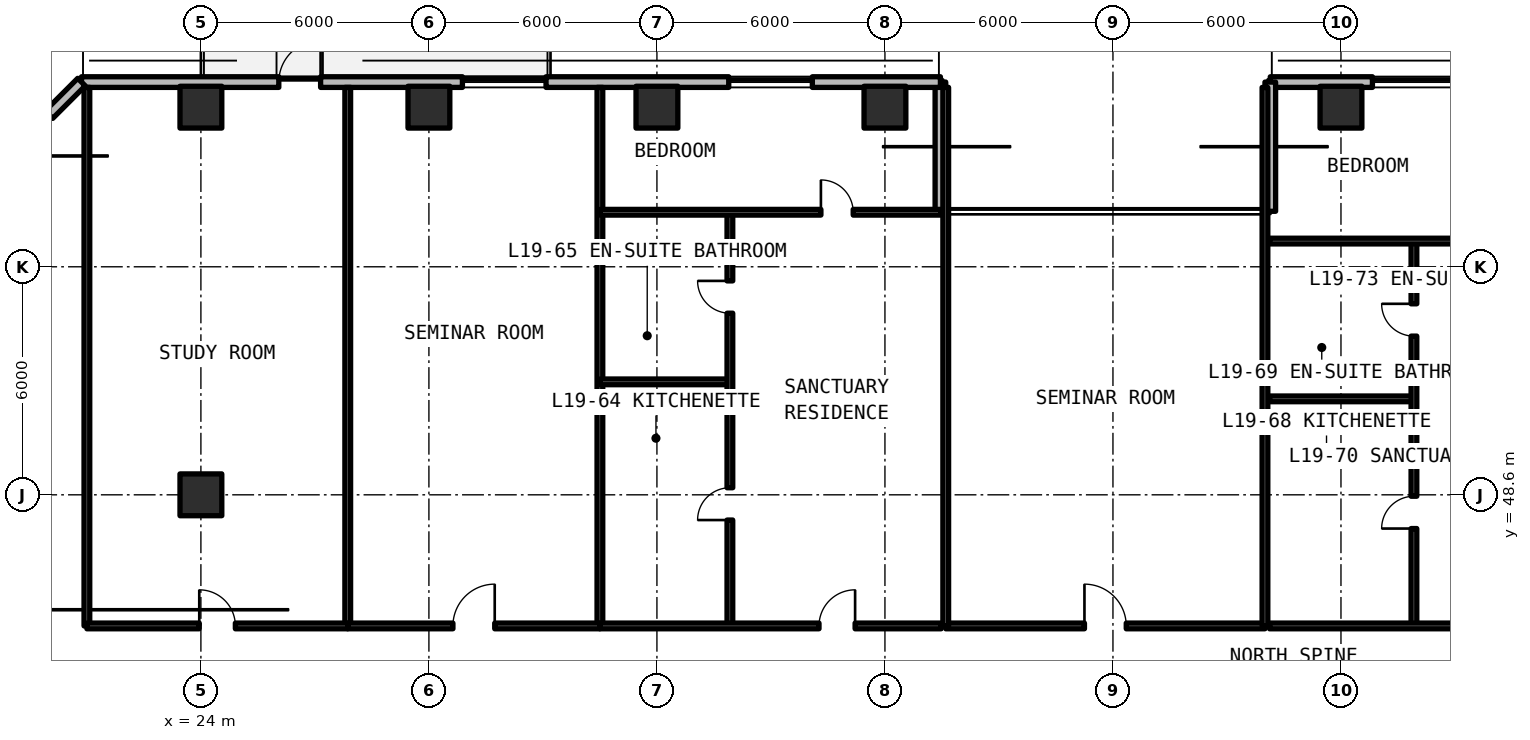
"""IFC4 building model, lengths in metres.
Left out: names, types, materials, properties, quantities, classifications, styles, units other than length and angle.
Written with IfcOpenShell. Run it as: python <this file> out.ifc"""

import sys

from ifc_helpers import new_model, si_unit, direction, frame, frame_2d, origin, origin_2d, place, context, subcontext, project, spatial, rectangle, extrude, element, fill, save


model = new_model("IFC4")
c1 = context("Model", 3, precision=1e-05, world=origin(), true_north=direction((0.0, 1.0)))
c2 = subcontext(c1, "Body", "Model", "MODEL_VIEW")
j1 = project(units=[si_unit("LENGTHUNIT", "METRE"), si_unit("PLANEANGLEUNIT", "RADIAN")], contexts=[c1])
p1 = place(None, origin())
s1 = spatial("IfcSite", under=j1, at=p1, CompositionType="ELEMENT")
p2 = place(p1, origin())
s2 = spatial("IfcBuilding", under=s1, at=p2, CompositionType="ELEMENT")
p3 = place(p2, frame((0.0, 0.0, 69.63)))
s3 = spatial("IfcBuildingStorey", under=s2, at=p3, CompositionType="ELEMENT", Elevation=69.63)
for number, where, z_axis, x_axis in (
    (1, (24.0, 48.6, 0.0), (0.0, 0.0, 1.0), (1.0, 0.0, 0.0)),
    (2, (24.0, 58.8, 0.0), (0.0, 0.0, 1.0), (1.0, 0.0, 0.0)),
    (3, (30.0, 58.8, 0.0), (0.0, 0.0, 1.0), (1.0, 0.0, 0.0)),
    (4, (36.0, 58.8, 0.0), (0.0, 0.0, 1.0), (1.0, 0.0, 0.0)),
    (5, (42.0, 58.8, 0.0), (0.0, 0.0, 1.0), (1.0, 0.0, 0.0)),
    (6, (54.0, 58.8, 0.0), (0.0, 0.0, 1.0), (1.0, 0.0, 0.0)),
):
    element("IfcColumn", number, at=place(p3, frame(where, z_axis=z_axis, x_axis=x_axis)), inside=s3, PredefinedType="COLUMN", context=c2, shape_type="SweptSolid", body=[
        extrude(rectangle(XDim=1.1, YDim=1.1, at=origin_2d()), origin(), (0.0, 0.0, 1.0), 3.63),
    ])
p4 = place(p3, frame((96.542, 59.46, 0.0), z_axis=(0.0, 0.0, 1.0), x_axis=(-1.0, 0.0, 0.0)))
e7 = element("IfcWall", 7, at=p4, inside=s3, PredefinedType="SOLIDWALL", context=c2, shape_type="SweptSolid", body=[
    extrude(rectangle(XDim=44.402, YDim=0.28, at=frame_2d((22.201, 0.0))), origin(), (0.0, 0.0, 1.0), 3.35),
])
p5 = place(p4, frame((32.592, 0.0, 0.0)))
e8 = element("IfcOpeningElement", 8, at=p5, cuts=e7, PredefinedType="OPENING", context=c2, shape_type="SweptSolid", body=[
    extrude(rectangle(XDim=1.1, YDim=2.15, at=frame_2d((0.55, 1.075))), frame((0.0, 0.15, 0.0), z_axis=(0.0, -1.0, 0.0), x_axis=(1.0, 0.0, 0.0)), (0.0, 0.0, 1.0), 0.3),
])
p6 = place(p4, frame((20.242, 0.0, 0.0)))
e9 = element("IfcOpeningElement", 9, at=p6, cuts=e7, PredefinedType="OPENING", context=c2, shape_type="SweptSolid", body=[
    extrude(rectangle(XDim=1.1, YDim=2.15, at=frame_2d((0.55, 1.075))), frame((0.0, 0.15, 0.0), z_axis=(0.0, -1.0, 0.0), x_axis=(1.0, 0.0, 0.0)), (0.0, 0.0, 1.0), 0.3),
])
p7 = place(p4, frame((9.392, 0.0, 0.0)))
e10 = element("IfcOpeningElement", 10, at=p7, cuts=e7, PredefinedType="OPENING", context=c2, shape_type="SweptSolid", body=[
    extrude(rectangle(XDim=1.1, YDim=2.15, at=frame_2d((0.55, 1.075))), frame((0.0, 0.15, 0.0), z_axis=(0.0, -1.0, 0.0), x_axis=(1.0, 0.0, 0.0)), (0.0, 0.0, 1.0), 0.3),
])
p8 = place(p4, frame((39.514, 0.0, 0.78)))
e11 = element("IfcOpeningElement", 11, at=p8, cuts=e7, PredefinedType="OPENING", context=c2, shape_type="SweptSolid", body=[
    extrude(rectangle(XDim=2.2, YDim=1.66, at=frame_2d((1.1, 0.83))), frame((0.0, 0.15, 0.0), z_axis=(0.0, -1.0, 0.0), x_axis=(1.0, 0.0, 0.0)), (0.0, 0.0, 1.0), 0.3),
])
p9 = place(p4, frame((25.379, 0.0, 0.78)))
e12 = element("IfcOpeningElement", 12, at=p9, cuts=e7, PredefinedType="OPENING", context=c2, shape_type="SweptSolid", body=[
    extrude(rectangle(XDim=2.2, YDim=1.66, at=frame_2d((1.1, 0.83))), frame((0.0, 0.15, 0.0), z_axis=(0.0, -1.0, 0.0), x_axis=(1.0, 0.0, 0.0)), (0.0, 0.0, 1.0), 0.3),
])
p10 = place(p4, frame((2.564, 0.0, 0.78)))
e13 = element("IfcOpeningElement", 13, at=p10, cuts=e7, PredefinedType="OPENING", context=c2, shape_type="SweptSolid", body=[
    extrude(rectangle(XDim=2.2, YDim=1.66, at=frame_2d((1.1, 0.83))), frame((0.0, 0.15, 0.0), z_axis=(0.0, -1.0, 0.0), x_axis=(1.0, 0.0, 0.0)), (0.0, 0.0, 1.0), 0.3),
])
for number, where, z_axis, x_axis in (
    (14, (52.14, 59.46, 0.0), (0.0, 0.0, 1.0), (0.0, -1.0, 0.0)),
    (15, (43.46, 56.06, 0.0), (0.0, 0.0, 1.0), (0.0, 1.0, 0.0)),
):
    element("IfcWall", number, at=place(p3, frame(where, z_axis=z_axis, x_axis=x_axis)), inside=s3, PredefinedType="SOLIDWALL", context=c2, shape_type="SweptSolid", body=[
        extrude(rectangle(XDim=3.4, YDim=0.28, at=frame_2d((1.7, 0.0))), origin(), (0.0, 0.0, 1.0), 3.35),
    ])
p11 = place(p3, frame((43.46, 59.46, 0.0), z_axis=(0.0, 0.0, 1.0), x_axis=(-1.0, 0.0, 0.0)))
e16 = element("IfcWall", 16, at=p11, inside=s3, PredefinedType="SOLIDWALL", context=c2, shape_type="SweptSolid", body=[
    extrude(rectangle(XDim=22.602, YDim=0.28, at=frame_2d((11.301, 0.0))), origin(), (0.0, 0.0, 1.0), 3.35),
])
p12 = place(p11, frame((16.31, 0.0, 0.0)))
e17 = element("IfcOpeningElement", 17, at=p12, cuts=e16, PredefinedType="OPENING", context=c2, shape_type="SweptSolid", body=[
    extrude(rectangle(XDim=1.1, YDim=2.15, at=frame_2d((0.55, 1.075))), frame((0.0, 0.15, 0.0), z_axis=(0.0, -1.0, 0.0), x_axis=(1.0, 0.0, 0.0)), (0.0, 0.0, 1.0), 0.3),
])
p13 = place(p11, frame((10.378, 0.0, 0.78)))
e18 = element("IfcOpeningElement", 18, at=p13, cuts=e16, PredefinedType="OPENING", context=c2, shape_type="SweptSolid", body=[
    extrude(rectangle(XDim=2.2, YDim=1.66, at=frame_2d((1.1, 0.83))), frame((0.0, 0.15, 0.0), z_axis=(0.0, -1.0, 0.0), x_axis=(1.0, 0.0, 0.0)), (0.0, 0.0, 1.0), 0.3),
])
p14 = place(p11, frame((3.37, 0.0, 0.78)))
e19 = element("IfcOpeningElement", 19, at=p14, cuts=e16, PredefinedType="OPENING", context=c2, shape_type="SweptSolid", body=[
    extrude(rectangle(XDim=2.2, YDim=1.66, at=frame_2d((1.1, 0.83))), frame((0.0, 0.15, 0.0), z_axis=(0.0, -1.0, 0.0), x_axis=(1.0, 0.0, 0.0)), (0.0, 0.0, 1.0), 0.3),
])
p15 = place(p3, frame((20.858, 59.46, 0.0), z_axis=(0.0, 0.0, 1.0), x_axis=(-0.707106781187, -0.707106781187, 0.0)))
e20 = element("IfcWall", 20, at=p15, inside=s3, PredefinedType="SOLIDWALL", context=c2, shape_type="SweptSolid", body=[
    extrude(rectangle(XDim=5.824, YDim=0.28, at=frame_2d((2.912, 0.0))), origin(), (0.0, 0.0, 1.0), 3.35),
])
p16 = place(p15, frame((1.212, 0.0, 0.78)))
e21 = element("IfcOpeningElement", 21, at=p16, cuts=e20, PredefinedType="OPENING", context=c2, shape_type="SweptSolid", body=[
    extrude(rectangle(XDim=3.4, YDim=1.66, at=frame_2d((1.7, 0.83))), frame((0.0, 0.15, 0.0), z_axis=(0.0, -1.0, 0.0), x_axis=(1.0, 0.0, 0.0)), (0.0, 0.0, 1.0), 0.3),
])
p17 = place(p3, frame((43.6, 45.15, 0.0), z_axis=(0.0, 0.0, 1.0), x_axis=(1.0, 0.0, 0.0)))
e22 = element("IfcWall", 22, at=p17, inside=s3, PredefinedType="SOLIDWALL", context=c2, shape_type="SweptSolid", body=[
    extrude(rectangle(XDim=8.4, YDim=0.15, at=frame_2d((4.2, 0.0))), origin(), (0.0, 0.0, 1.0), 2.57),
])
p18 = place(p17, frame((3.65, 0.0, 0.0)))
e23 = element("IfcOpeningElement", 23, at=p18, cuts=e22, PredefinedType="OPENING", context=c2, shape_type="SweptSolid", body=[
    extrude(rectangle(XDim=1.1, YDim=2.15, at=frame_2d((0.55, 1.075))), frame((0.0, 0.085, 0.0), z_axis=(0.0, -1.0, 0.0), x_axis=(1.0, 0.0, 0.0)), (0.0, 0.0, 1.0), 0.17),
])
for number, where, z_axis, x_axis in (
    (24, (43.6, 45.15, 0.0), (0.0, 0.0, 1.0), (0.0, 1.0, 0.0)),
    (25, (52.0, 45.15, 0.0), (0.0, 0.0, 1.0), (0.0, 1.0, 0.0)),
    (26, (21.0, 45.15, 0.0), (0.0, 0.0, 1.0), (0.0, 1.0, 0.0)),
    (27, (27.864, 45.15, 0.0), (0.0, 0.0, 1.0), (0.0, 1.0, 0.0)),
):
    element("IfcWall", number, at=place(p3, frame(where, z_axis=z_axis, x_axis=x_axis)), inside=s3, PredefinedType="SOLIDWALL", context=c2, shape_type="SweptSolid", body=[
        extrude(rectangle(XDim=14.17, YDim=0.15, at=frame_2d((7.085, 0.0))), origin(), (0.0, 0.0, 1.0), 2.57),
    ])
p19 = place(p3, frame((21.0, 45.15, 0.0), z_axis=(0.0, 0.0, 1.0), x_axis=(1.0, 0.0, 0.0)))
e28 = element("IfcWall", 28, at=p19, inside=s3, PredefinedType="SOLIDWALL", context=c2, shape_type="SweptSolid", body=[
    extrude(rectangle(XDim=6.864, YDim=0.15, at=frame_2d((3.432, 0.0))), origin(), (0.0, 0.0, 1.0), 2.57),
])
p20 = place(p19, frame((2.957, 0.0, 0.0)))
e29 = element("IfcOpeningElement", 29, at=p20, cuts=e28, PredefinedType="OPENING", context=c2, shape_type="SweptSolid", body=[
    extrude(rectangle(XDim=0.95, YDim=2.15, at=frame_2d((0.475, 1.075))), frame((0.0, 0.085, 0.0), z_axis=(0.0, -1.0, 0.0), x_axis=(1.0, 0.0, 0.0)), (0.0, 0.0, 1.0), 0.17),
])
p21 = place(p3, frame((34.5, 45.15, 0.0), z_axis=(0.0, 0.0, 1.0), x_axis=(0.0, 1.0, 0.0)))
e30 = element("IfcWall", 30, at=p21, inside=s3, PredefinedType="SOLIDWALL", context=c2, shape_type="SweptSolid", body=[
    extrude(rectangle(XDim=14.17, YDim=0.15, at=frame_2d((7.085, 0.0))), origin(), (0.0, 0.0, 1.0), 2.57),
])
p22 = place(p3, frame((27.864, 45.15, 0.0), z_axis=(0.0, 0.0, 1.0), x_axis=(1.0, 0.0, 0.0)))
e31 = element("IfcWall", 31, at=p22, inside=s3, PredefinedType="SOLIDWALL", context=c2, shape_type="SweptSolid", body=[
    extrude(rectangle(XDim=6.635, YDim=0.15, at=frame_2d((3.318, 0.0))), origin(), (0.0, 0.0, 1.0), 2.57),
])
p23 = place(p22, frame((2.768, 0.0, 0.0)))
e32 = element("IfcOpeningElement", 32, at=p23, cuts=e31, PredefinedType="OPENING", context=c2, shape_type="SweptSolid", body=[
    extrude(rectangle(XDim=1.1, YDim=2.15, at=frame_2d((0.55, 1.075))), frame((0.0, 0.085, 0.0), z_axis=(0.0, -1.0, 0.0), x_axis=(1.0, 0.0, 0.0)), (0.0, 0.0, 1.0), 0.17),
])
p24 = place(p3, frame((34.5, 51.572, 0.0), z_axis=(0.0, 0.0, 1.0), x_axis=(1.0, 0.0, 0.0)))
e33 = element("IfcWall", 33, at=p24, inside=s3, PredefinedType="PARTITIONING", context=c2, shape_type="SweptSolid", body=[
    extrude(rectangle(XDim=3.42, YDim=0.15, at=frame_2d((1.71, 0.0))), origin(), (0.0, 0.0, 1.0), 2.57),
])
p25 = place(p3, frame((37.92, 45.15, 0.0), z_axis=(0.0, 0.0, 1.0), x_axis=(0.0, 1.0, 0.0)))
e34 = element("IfcWall", 34, at=p25, inside=s3, PredefinedType="PARTITIONING", context=c2, shape_type="SweptSolid", body=[
    extrude(rectangle(XDim=10.885, YDim=0.15, at=frame_2d((5.443, 0.0))), origin(), (0.0, 0.0, 1.0), 2.57),
])
p26 = place(p25, frame((2.786, 0.0, 0.0)))
e35 = element("IfcOpeningElement", 35, at=p26, cuts=e34, PredefinedType="OPENING", context=c2, shape_type="SweptSolid", body=[
    extrude(rectangle(XDim=0.85, YDim=2.1, at=frame_2d((0.425, 1.05))), frame((0.0, 0.085, 0.0), z_axis=(0.0, -1.0, 0.0), x_axis=(1.0, 0.0, 0.0)), (0.0, 0.0, 1.0), 0.17),
])
p27 = place(p25, frame((8.229, 0.0, 0.0)))
e36 = element("IfcOpeningElement", 36, at=p27, cuts=e34, PredefinedType="OPENING", context=c2, shape_type="SweptSolid", body=[
    extrude(rectangle(XDim=0.85, YDim=2.1, at=frame_2d((0.425, 1.05))), frame((0.0, 0.085, 0.0), z_axis=(0.0, -1.0, 0.0), x_axis=(1.0, 0.0, 0.0)), (0.0, 0.0, 1.0), 0.17),
])
p28 = place(p3, frame((34.5, 56.035, 0.0), z_axis=(0.0, 0.0, 1.0), x_axis=(1.0, 0.0, 0.0)))
e37 = element("IfcWall", 37, at=p28, inside=s3, PredefinedType="PARTITIONING", context=c2, shape_type="SweptSolid", body=[
    extrude(rectangle(XDim=8.98, YDim=0.15, at=frame_2d((4.49, 0.0))), origin(), (0.0, 0.0, 1.0), 2.57),
])
p29 = place(p28, frame((5.816, 0.0, 0.0)))
e38 = element("IfcOpeningElement", 38, at=p29, cuts=e37, PredefinedType="OPENING", context=c2, shape_type="SweptSolid", body=[
    extrude(rectangle(XDim=0.85, YDim=2.1, at=frame_2d((0.425, 1.05))), frame((0.0, 0.085, 0.0), z_axis=(0.0, -1.0, 0.0), x_axis=(1.0, 0.0, 0.0)), (0.0, 0.0, 1.0), 0.17),
])
p30 = place(p3, frame((34.5, 45.15, 0.0), z_axis=(0.0, 0.0, 1.0), x_axis=(1.0, 0.0, 0.0)))
e39 = element("IfcWall", 39, at=p30, inside=s3, PredefinedType="SOLIDWALL", context=c2, shape_type="SweptSolid", body=[
    extrude(rectangle(XDim=8.98, YDim=0.15, at=frame_2d((4.49, 0.0))), origin(), (0.0, 0.0, 1.0), 2.57),
])
p31 = place(p30, frame((5.766, 0.0, 0.0)))
e40 = element("IfcOpeningElement", 40, at=p31, cuts=e39, PredefinedType="OPENING", context=c2, shape_type="SweptSolid", body=[
    extrude(rectangle(XDim=0.95, YDim=2.15, at=frame_2d((0.475, 1.075))), frame((0.0, 0.085, 0.0), z_axis=(0.0, -1.0, 0.0), x_axis=(1.0, 0.0, 0.0)), (0.0, 0.0, 1.0), 0.17),
])
p32 = place(p3, frame((52.12, 51.125, 0.0), z_axis=(0.0, 0.0, 1.0), x_axis=(1.0, 0.0, 0.0)))
e41 = element("IfcWall", 41, at=p32, inside=s3, PredefinedType="PARTITIONING", context=c2, shape_type="SweptSolid", body=[
    extrude(rectangle(XDim=3.8, YDim=0.15, at=frame_2d((1.9, 0.0))), origin(), (0.0, 0.0, 1.0), 2.57),
])
p33 = place(p3, frame((55.92, 45.15, 0.0), z_axis=(0.0, 0.0, 1.0), x_axis=(0.0, 1.0, 0.0)))
e42 = element("IfcWall", 42, at=p33, inside=s3, PredefinedType="PARTITIONING", context=c2, shape_type="SweptSolid", body=[
    extrude(rectangle(XDim=10.127, YDim=0.15, at=frame_2d((5.063, 0.0))), origin(), (0.0, 0.0, 1.0), 2.57),
])
p34 = place(p33, frame((2.562, 0.0, 0.0)))
e43 = element("IfcOpeningElement", 43, at=p34, cuts=e42, PredefinedType="OPENING", context=c2, shape_type="SweptSolid", body=[
    extrude(rectangle(XDim=0.85, YDim=2.1, at=frame_2d((0.425, 1.05))), frame((0.0, 0.085, 0.0), z_axis=(0.0, -1.0, 0.0), x_axis=(1.0, 0.0, 0.0)), (0.0, 0.0, 1.0), 0.17),
])
p35 = place(p33, frame((7.626, 0.0, 0.0)))
e44 = element("IfcOpeningElement", 44, at=p35, cuts=e42, PredefinedType="OPENING", context=c2, shape_type="SweptSolid", body=[
    extrude(rectangle(XDim=0.85, YDim=2.1, at=frame_2d((0.425, 1.05))), frame((0.0, 0.085, 0.0), z_axis=(0.0, -1.0, 0.0), x_axis=(1.0, 0.0, 0.0)), (0.0, 0.0, 1.0), 0.17),
])
p36 = place(p3, frame((52.12, 55.277, 0.0), z_axis=(0.0, 0.0, 1.0), x_axis=(1.0, 0.0, 0.0)))
e45 = element("IfcWall", 45, at=p36, inside=s3, PredefinedType="PARTITIONING", context=c2, shape_type="SweptSolid", body=[
    extrude(rectangle(XDim=7.296, YDim=0.15, at=frame_2d((3.648, 0.0))), origin(), (0.0, 0.0, 1.0), 2.57),
])
p37 = place(p36, frame((5.163, 0.0, 0.0)))
e46 = element("IfcOpeningElement", 46, at=p37, cuts=e45, PredefinedType="OPENING", context=c2, shape_type="SweptSolid", body=[
    extrude(rectangle(XDim=0.85, YDim=2.1, at=frame_2d((0.425, 1.05))), frame((0.0, 0.085, 0.0), z_axis=(0.0, -1.0, 0.0), x_axis=(1.0, 0.0, 0.0)), (0.0, 0.0, 1.0), 0.17),
])
p38 = place(p3, frame((52.12, 45.15, 0.0), z_axis=(0.0, 0.0, 1.0), x_axis=(1.0, 0.0, 0.0)))
e47 = element("IfcWall", 47, at=p38, inside=s3, PredefinedType="SOLIDWALL", context=c2, shape_type="SweptSolid", body=[
    extrude(rectangle(XDim=7.296, YDim=0.15, at=frame_2d((3.648, 0.0))), origin(), (0.0, 0.0, 1.0), 2.57),
])
p39 = place(p38, frame((5.113, 0.0, 0.0)))
e48 = element("IfcOpeningElement", 48, at=p39, cuts=e47, PredefinedType="OPENING", context=c2, shape_type="SweptSolid", body=[
    extrude(rectangle(XDim=0.95, YDim=2.15, at=frame_2d((0.475, 1.075))), frame((0.0, 0.085, 0.0), z_axis=(0.0, -1.0, 0.0), x_axis=(1.0, 0.0, 0.0)), (0.0, 0.0, 1.0), 0.17),
])
p40 = place(p8, origin())
e49 = element("IfcWindow", 49, at=p40, inside=s3, PartitioningType="SINGLE_PANEL", PredefinedType="WINDOW", context=c2, shape_type="SweptSolid", body=[
    extrude(rectangle(XDim=2.2, YDim=1.66, at=frame_2d((1.1, 0.83))), frame((0.0, 0.03, 0.0), z_axis=(0.0, -1.0, 0.0), x_axis=(1.0, 0.0, 0.0)), (0.0, 0.0, 1.0), 0.06),
])
fill(e11, e49)
p41 = place(p12, frame((1.1, 0.0, 0.0), z_axis=(0.0, 0.0, 1.0), x_axis=(-1.0, 0.0, 0.0)))
e50 = element("IfcDoor", 50, at=p41, inside=s3, OperationType="SINGLE_SWING_LEFT", PredefinedType="DOOR", context=c2, shape_type="SweptSolid", body=[
    extrude(rectangle(XDim=1.1, YDim=2.15, at=frame_2d((0.55, 1.075))), frame((0.0, 0.025, 0.0), z_axis=(0.0, -1.0, 0.0), x_axis=(1.0, 0.0, 0.0)), (0.0, 0.0, 1.0), 0.05),
])
fill(e17, e50)
p42 = place(p13, origin())
e51 = element("IfcWindow", 51, at=p42, inside=s3, PartitioningType="SINGLE_PANEL", PredefinedType="WINDOW", context=c2, shape_type="SweptSolid", body=[
    extrude(rectangle(XDim=2.2, YDim=1.66, at=frame_2d((1.1, 0.83))), frame((0.0, 0.03, 0.0), z_axis=(0.0, -1.0, 0.0), x_axis=(1.0, 0.0, 0.0)), (0.0, 0.0, 1.0), 0.06),
])
fill(e18, e51)
p43 = place(p14, origin())
e52 = element("IfcWindow", 52, at=p43, inside=s3, PartitioningType="SINGLE_PANEL", PredefinedType="WINDOW", context=c2, shape_type="SweptSolid", body=[
    extrude(rectangle(XDim=2.2, YDim=1.66, at=frame_2d((1.1, 0.83))), frame((0.0, 0.03, 0.0), z_axis=(0.0, -1.0, 0.0), x_axis=(1.0, 0.0, 0.0)), (0.0, 0.0, 1.0), 0.06),
])
fill(e19, e52)
p44 = place(p18, origin())
e53 = element("IfcDoor", 53, at=p44, inside=s3, OperationType="SINGLE_SWING_LEFT", PredefinedType="DOOR", context=c2, shape_type="SweptSolid", body=[
    extrude(rectangle(XDim=1.1, YDim=2.15, at=frame_2d((0.55, 1.075))), frame((0.0, 0.025, 0.0), z_axis=(0.0, -1.0, 0.0), x_axis=(1.0, 0.0, 0.0)), (0.0, 0.0, 1.0), 0.05),
])
fill(e23, e53)
p45 = place(p20, origin())
e54 = element("IfcDoor", 54, at=p45, inside=s3, OperationType="SINGLE_SWING_LEFT", PredefinedType="DOOR", context=c2, shape_type="SweptSolid", body=[
    extrude(rectangle(XDim=0.95, YDim=2.15, at=frame_2d((0.475, 1.075))), frame((0.0, 0.025, 0.0), z_axis=(0.0, -1.0, 0.0), x_axis=(1.0, 0.0, 0.0)), (0.0, 0.0, 1.0), 0.05),
])
fill(e29, e54)
p46 = place(p23, origin())
e55 = element("IfcDoor", 55, at=p46, inside=s3, OperationType="SINGLE_SWING_RIGHT", PredefinedType="DOOR", context=c2, shape_type="SweptSolid", body=[
    extrude(rectangle(XDim=1.1, YDim=2.15, at=frame_2d((0.55, 1.075))), frame((0.0, 0.025, 0.0), z_axis=(0.0, -1.0, 0.0), x_axis=(1.0, 0.0, 0.0)), (0.0, 0.0, 1.0), 0.05),
])
fill(e32, e55)
p47 = place(p26, origin())
e56 = element("IfcDoor", 56, at=p47, inside=s3, OperationType="SINGLE_SWING_LEFT", PredefinedType="DOOR", context=c2, shape_type="SweptSolid", body=[
    extrude(rectangle(XDim=0.85, YDim=2.1, at=frame_2d((0.425, 1.05))), frame((0.0, 0.025, 0.0), z_axis=(0.0, -1.0, 0.0), x_axis=(1.0, 0.0, 0.0)), (0.0, 0.0, 1.0), 0.05),
])
fill(e35, e56)
p48 = place(p27, origin())
e57 = element("IfcDoor", 57, at=p48, inside=s3, OperationType="SINGLE_SWING_RIGHT", PredefinedType="DOOR", context=c2, shape_type="SweptSolid", body=[
    extrude(rectangle(XDim=0.85, YDim=2.1, at=frame_2d((0.425, 1.05))), frame((0.0, 0.025, 0.0), z_axis=(0.0, -1.0, 0.0), x_axis=(1.0, 0.0, 0.0)), (0.0, 0.0, 1.0), 0.05),
])
fill(e36, e57)
p49 = place(p29, origin())
e58 = element("IfcDoor", 58, at=p49, inside=s3, OperationType="SINGLE_SWING_LEFT", PredefinedType="DOOR", context=c2, shape_type="SweptSolid", body=[
    extrude(rectangle(XDim=0.85, YDim=2.1, at=frame_2d((0.425, 1.05))), frame((0.0, 0.025, 0.0), z_axis=(0.0, -1.0, 0.0), x_axis=(1.0, 0.0, 0.0)), (0.0, 0.0, 1.0), 0.05),
])
fill(e38, e58)
p50 = place(p31, origin())
e59 = element("IfcDoor", 59, at=p50, inside=s3, OperationType="SINGLE_SWING_RIGHT", PredefinedType="DOOR", context=c2, shape_type="SweptSolid", body=[
    extrude(rectangle(XDim=0.95, YDim=2.15, at=frame_2d((0.475, 1.075))), frame((0.0, 0.025, 0.0), z_axis=(0.0, -1.0, 0.0), x_axis=(1.0, 0.0, 0.0)), (0.0, 0.0, 1.0), 0.05),
])
fill(e40, e59)
p51 = place(p34, origin())
e60 = element("IfcDoor", 60, at=p51, inside=s3, OperationType="SINGLE_SWING_LEFT", PredefinedType="DOOR", context=c2, shape_type="SweptSolid", body=[
    extrude(rectangle(XDim=0.85, YDim=2.1, at=frame_2d((0.425, 1.05))), frame((0.0, 0.025, 0.0), z_axis=(0.0, -1.0, 0.0), x_axis=(1.0, 0.0, 0.0)), (0.0, 0.0, 1.0), 0.05),
])
fill(e43, e60)
p52 = place(p35, origin())
e61 = element("IfcDoor", 61, at=p52, inside=s3, OperationType="SINGLE_SWING_RIGHT", PredefinedType="DOOR", context=c2, shape_type="SweptSolid", body=[
    extrude(rectangle(XDim=0.85, YDim=2.1, at=frame_2d((0.425, 1.05))), frame((0.0, 0.025, 0.0), z_axis=(0.0, -1.0, 0.0), x_axis=(1.0, 0.0, 0.0)), (0.0, 0.0, 1.0), 0.05),
])
fill(e44, e61)
save(model, sys.argv[1])
